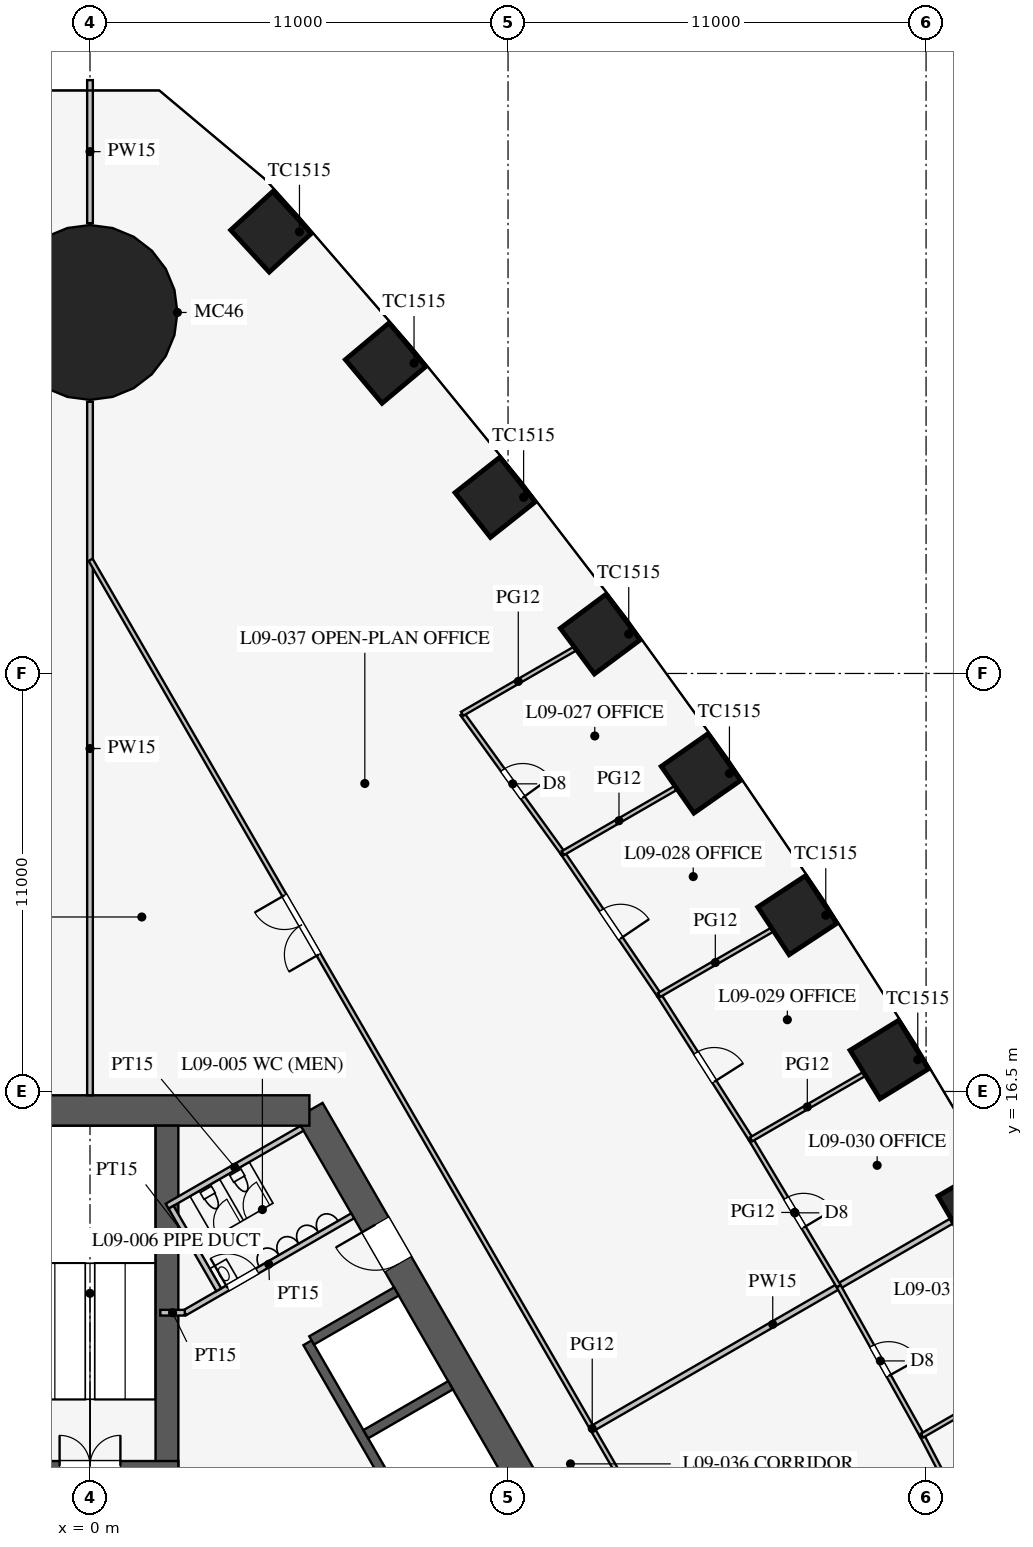
"""IFC4 building model, lengths in metres.
Left out: names, types, materials, properties, quantities, classifications, styles, units other than length and angle.
Written with IfcOpenShell. Run it as: python <this file> out.ifc"""

import sys

from ifc_helpers import new_model, si_unit, direction, frame, frame_2d, origin, origin_2d, place, context, subcontext, project, spatial, rectangle, circle, extrude, element, fill, save


model = new_model("IFC4")
c1 = context("Model", 3, precision=1e-05, world=origin(), true_north=direction((0.0, 1.0)))
c2 = subcontext(c1, "Body", "Model", "MODEL_VIEW")
j1 = project(units=[si_unit("LENGTHUNIT", "METRE"), si_unit("PLANEANGLEUNIT", "RADIAN")], contexts=[c1])
p1 = place(None, origin())
s1 = spatial("IfcSite", under=j1, at=p1, CompositionType="ELEMENT")
p2 = place(p1, origin())
s2 = spatial("IfcBuilding", under=s1, at=p2, CompositionType="ELEMENT")
p3 = place(p2, frame((0.0, 0.0, 41.7)))
s3 = spatial("IfcBuildingStorey", under=s2, at=p3, CompositionType="ELEMENT", Elevation=41.7)
for number, where, z_axis, x_axis in (
    (1, (23.338, 13.474, 0.0), (0.0, 0.0, 1.0), (-0.5, 0.866, 0.0)),
    (2, (21.031, 17.339, 0.0), (0.0, 0.0, 1.0), (-0.525, 0.851, 0.0)),
    (3, (18.611, 21.137, 0.0), (0.0, 0.0, 1.0), (-0.549, 0.836, 0.0)),
    (4, (16.076, 24.87, 0.0), (0.0, 0.0, 1.0), (-0.574, 0.819, 0.0)),
    (5, (13.426, 28.536, 0.0), (0.0, 0.0, 1.0), (-0.597, 0.802, 0.0)),
    (6, (10.66, 32.135, 0.0), (0.0, 0.0, 1.0), (-0.62, 0.784, 0.0)),
    (7, (7.776, 35.667, 0.0), (0.0, 0.0, 1.0), (-0.643, 0.766, 0.0)),
    (8, (4.762, 39.122, 0.0), (0.0, 0.0, 1.0), (-0.676, 0.737, 0.0)),
):
    element("IfcColumn", number, at=place(p3, frame(where, z_axis=z_axis, x_axis=x_axis)), inside=s3, PredefinedType="COLUMN", context=c2, shape_type="SweptSolid", body=[
        extrude(rectangle(XDim=1.5, YDim=1.5, at=origin_2d()), origin(), (0.0, 0.0, 1.0), 4.2),
    ])
p4 = place(p3, frame((0.0, 37.0, 0.0), z_axis=(0.0, 0.0, 1.0), x_axis=(1.0, 0.0, 0.0)))
e9 = element("IfcColumn", 9, at=p4, inside=s3, PredefinedType="COLUMN", context=c2, shape_type="SweptSolid", body=[
    extrude(circle(Radius=2.3, at=origin_2d()), origin(), (0.0, 0.0, 1.0), 4.2),
])
p5 = place(p3, frame((16.743, -3.0, 0.0), z_axis=(0.0, 0.0, 1.0), x_axis=(-0.500002442456, 0.866023993627, 0.0)))
e10 = element("IfcWall", 10, at=p5, inside=s3, PredefinedType="SHEAR", context=c2, shape_type="SweptSolid", body=[
    extrude(rectangle(XDim=21.939, YDim=0.8, at=frame_2d((10.97, 0.0))), origin(), (0.0, 0.0, 1.0), 4.2),
])
p6 = place(p5, frame((17.27, 0.0, 0.0)))
e11 = element("IfcOpeningElement", 11, at=p6, cuts=e10, PredefinedType="OPENING", context=c2, shape_type="SweptSolid", body=[
    extrude(rectangle(XDim=1.2, YDim=2.1, at=frame_2d((0.6, 1.05))), frame((0.0, 0.41, 0.0), z_axis=(0.0, -1.0, 0.0), x_axis=(1.0, 0.0, 0.0)), (0.0, 0.0, 1.0), 0.82),
])
p7 = place(p5, frame((3.47, 0.0, 0.0)))
e12 = element("IfcOpeningElement", 12, at=p7, cuts=e10, PredefinedType="OPENING", context=c2, shape_type="SweptSolid", body=[
    extrude(rectangle(XDim=1.2, YDim=2.1, at=frame_2d((0.6, 1.05))), frame((0.0, 0.41, 0.0), z_axis=(0.0, -1.0, 0.0), x_axis=(1.0, 0.0, 0.0)), (0.0, 0.0, 1.0), 0.82),
])
p8 = place(p3, frame((5.773, 16.0, 0.0), z_axis=(0.0, 0.0, 1.0), x_axis=(-1.0, 0.0, 0.0)))
e13 = element("IfcWall", 13, at=p8, inside=s3, PredefinedType="SHEAR", context=c2, shape_type="SweptSolid", body=[
    extrude(rectangle(XDim=11.547, YDim=0.8, at=frame_2d((5.773, 0.0))), origin(), (0.0, 0.0, 1.0), 4.2),
])
p9 = place(p3, frame((11.424, 0.014, 0.0), z_axis=(0.0, 0.0, 1.0), x_axis=(-0.500001763848, 0.866024385424, 0.0)))
e14 = element("IfcWall", 14, at=p9, inside=s3, PredefinedType="SHEAR", context=c2, shape_type="SweptSolid", body=[
    extrude(rectangle(XDim=11.4, YDim=0.25, at=frame_2d((5.7, 0.0))), origin(), (0.0, 0.0, 1.0), 4.2),
])
p10 = place(p3, frame((7.257, 7.481, 0.0), z_axis=(0.0, 0.0, 1.0), x_axis=(0.866046643894, 0.499963209246, 0.0)))
e15 = element("IfcWall", 15, at=p10, inside=s3, PredefinedType="SHEAR", context=c2, shape_type="SweptSolid", body=[
    extrude(rectangle(XDim=2.575, YDim=0.25, at=frame_2d((1.288, 0.0))), origin(), (0.0, 0.0, 1.0), 4.2),
])
p11 = place(p3, frame((5.832, 9.949, 0.0), z_axis=(0.0, 0.0, 1.0), x_axis=(0.866029291668, 0.499993265928, 0.0)))
e16 = element("IfcWall", 16, at=p11, inside=s3, PredefinedType="SHEAR", context=c2, shape_type="SweptSolid", body=[
    extrude(rectangle(XDim=2.575, YDim=0.25, at=frame_2d((1.288, 0.0))), origin(), (0.0, 0.0, 1.0), 4.2),
])
p12 = place(p3, frame((2.025, 6.525, 0.0), z_axis=(0.0, 0.0, 1.0), x_axis=(0.0, 1.0, 0.0)))
e17 = element("IfcWall", 17, at=p12, inside=s3, PredefinedType="SHEAR", context=c2, shape_type="SweptSolid", body=[
    extrude(rectangle(XDim=9.075, YDim=0.6, at=frame_2d((4.538, 0.0))), origin(), (0.0, 0.0, 1.0), 4.2),
])
p13 = place(p3, frame((2.325, 6.65, 0.0), z_axis=(0.0, 0.0, 1.0), x_axis=(-1.0, 0.0, 0.0)))
e18 = element("IfcWall", 18, at=p13, inside=s3, PredefinedType="SHEAR", context=c2, shape_type="SweptSolid", body=[
    extrude(rectangle(XDim=4.65, YDim=0.25, at=frame_2d((2.325, 0.0))), origin(), (0.0, 0.0, 1.0), 4.2),
])
p14 = place(p13, frame((1.525, 0.0, 0.0)))
e19 = element("IfcOpeningElement", 19, at=p14, cuts=e18, PredefinedType="OPENING", context=c2, shape_type="SweptSolid", body=[
    extrude(rectangle(XDim=1.6, YDim=2.1, at=frame_2d((0.8, 1.05))), frame((0.0, 0.135, 0.0), z_axis=(0.0, -1.0, 0.0), x_axis=(1.0, 0.0, 0.0)), (0.0, 0.0, 1.0), 0.27),
])
p15 = place(p3, frame((2.495, 10.678, 0.0), z_axis=(0.0, 0.0, 1.0), x_axis=(0.86602216432, 0.500005610874, 0.0)))
e20 = element("IfcWall", 20, at=p15, inside=s3, PredefinedType="PARTITIONING", context=c2, shape_type="SweptSolid", body=[
    extrude(rectangle(XDim=5.1, YDim=0.15, at=frame_2d((2.55, 0.0))), origin(), (0.0, 0.0, 1.0), 4.0),
])
p16 = place(p15, frame((1.3, 0.0, 0.0)))
e21 = element("IfcOpeningElement", 21, at=p16, cuts=e20, PredefinedType="OPENING", context=c2, shape_type="SweptSolid", body=[
    extrude(rectangle(XDim=0.9, YDim=2.1, at=frame_2d((0.45, 1.05))), frame((0.0, 0.085, 0.0), z_axis=(0.0, -1.0, 0.0), x_axis=(1.0, 0.0, 0.0)), (0.0, 0.0, 1.0), 0.17),
])
p17 = place(p3, frame((2.495, 10.678, 0.0), z_axis=(0.0, 0.0, 1.0), x_axis=(-1.0, 0.0, 0.0)))
e22 = element("IfcWall", 22, at=p17, inside=s3, PredefinedType="PARTITIONING", context=c2, shape_type="SweptSolid", body=[
    extrude(rectangle(XDim=0.645, YDim=0.15, at=frame_2d((0.323, 0.0))), origin(), (0.0, 0.0, 1.0), 4.0),
])
p18 = place(p3, frame((2.031, 13.482, 0.0), z_axis=(0.0, 0.0, 1.0), x_axis=(0.866050731258, 0.499956128963, 0.0)))
e23 = element("IfcWall", 23, at=p18, inside=s3, PredefinedType="PARTITIONING", context=c2, shape_type="SweptSolid", body=[
    extrude(rectangle(XDim=4.1, YDim=0.15, at=frame_2d((2.05, 0.0))), origin(), (0.0, 0.0, 1.0), 4.0),
])
p19 = place(p3, frame((3.389, 11.281, 0.0), z_axis=(0.0, 0.0, 1.0), x_axis=(-0.499989096993, 0.866031698547, 0.0)))
e24 = element("IfcWall", 24, at=p19, inside=s3, PredefinedType="PARTITIONING", context=c2, shape_type="SweptSolid", body=[
    extrude(rectangle(XDim=2.51, YDim=0.15, at=frame_2d((1.255, 0.0))), origin(), (0.0, 0.0, 1.0), 4.0),
])
p20 = place(p3, frame((0.0, 16.4, 0.0), z_axis=(0.0, 0.0, 1.0), x_axis=(0.0, 1.0, 0.0)))
e25 = element("IfcWall", 25, at=p20, inside=s3, PredefinedType="PARTITIONING", context=c2, shape_type="SweptSolid", body=[
    extrude(rectangle(XDim=18.25, YDim=0.15, at=frame_2d((9.125, 0.0))), origin(), (0.0, 0.0, 1.0), 2.3),
])
p21 = place(p3, frame((0.0, 39.35, 0.0), z_axis=(0.0, 0.0, 1.0), x_axis=(0.0, 1.0, 0.0)))
e26 = element("IfcWall", 26, at=p21, inside=s3, PredefinedType="PARTITIONING", context=c2, shape_type="SweptSolid", body=[
    extrude(rectangle(XDim=3.764, YDim=0.15, at=frame_2d((1.882, 0.0))), origin(), (0.0, 0.0, 1.0), 2.3),
])
p22 = place(p3, frame((13.268, 7.66, 0.0), z_axis=(0.0, 0.0, 1.0), x_axis=(0.866017319748, 0.500014001701, 0.0)))
e27 = element("IfcWall", 27, at=p22, inside=s3, PredefinedType="PARTITIONING", context=c2, shape_type="SweptSolid", body=[
    extrude(rectangle(XDim=10.849, YDim=0.15, at=frame_2d((5.424, 0.0))), origin(), (0.0, 0.0, 1.0), 3.2),
])
p23 = place(p3, frame((26.415, -15.231, 0.0), z_axis=(0.0, 0.0, 1.0), x_axis=(-0.50000091641, 0.866024874695, 0.0)))
e28 = element("IfcWall", 28, at=p23, inside=s3, PredefinedType="PARTITIONING", context=c2, shape_type="SweptSolid", body=[
    extrude(rectangle(XDim=52.796, YDim=0.12, at=frame_2d((26.398, 0.0))), origin(), (0.0, 0.0, 1.0), 2.9),
])
p24 = place(p23, frame((10.2, 0.0, 0.15)))
e29 = element("IfcOpeningElement", 29, at=p24, cuts=e28, PredefinedType="OPENING", context=c2, shape_type="SweptSolid", body=[
    extrude(rectangle(XDim=1.8, YDim=2.1, at=frame_2d((0.9, 1.05))), frame((0.0, 0.07, 0.0), z_axis=(0.0, -1.0, 0.0), x_axis=(1.0, 0.0, 0.0)), (0.0, 0.0, 1.0), 0.14),
])
p25 = place(p23, frame((40.8, 0.0, 0.15)))
e30 = element("IfcOpeningElement", 30, at=p25, cuts=e28, PredefinedType="OPENING", context=c2, shape_type="SweptSolid", body=[
    extrude(rectangle(XDim=1.8, YDim=2.1, at=frame_2d((0.9, 1.05))), frame((0.0, 0.07, 0.0), z_axis=(0.0, -1.0, 0.0), x_axis=(1.0, 0.0, 0.0)), (0.0, 0.0, 1.0), 0.14),
])
p26 = place(p3, frame((19.701, 11.374, 0.0), z_axis=(0.0, 0.0, 1.0), x_axis=(-0.512483962191, 0.858696796604, 0.0)))
e31 = element("IfcWall", 31, at=p26, inside=s3, PredefinedType="PARTITIONING", context=c2, shape_type="SweptSolid", body=[
    extrude(rectangle(XDim=4.5, YDim=0.12, at=frame_2d((2.25, 0.0))), origin(), (0.0, 0.0, 1.0), 2.9),
])
p27 = place(p26, frame((1.8, 0.0, 0.15)))
e32 = element("IfcOpeningElement", 32, at=p27, cuts=e31, PredefinedType="OPENING", context=c2, shape_type="SweptSolid", body=[
    extrude(rectangle(XDim=0.9, YDim=2.1, at=frame_2d((0.45, 1.05))), frame((0.0, 0.07, 0.0), z_axis=(0.0, -1.0, 0.0), x_axis=(1.0, 0.0, 0.0)), (0.0, 0.0, 1.0), 0.14),
])
p28 = place(p3, frame((12.441, 22.771, 0.0), z_axis=(0.0, 0.0, 1.0), x_axis=(-0.585376255171, 0.810761765183, 0.0)))
e33 = element("IfcWall", 33, at=p28, inside=s3, PredefinedType="PARTITIONING", context=c2, shape_type="SweptSolid", body=[
    extrude(rectangle(XDim=4.523, YDim=0.12, at=frame_2d((2.262, 0.0))), origin(), (0.0, 0.0, 1.0), 2.9),
])
p29 = place(p28, frame((1.8, 0.0, 0.15)))
e34 = element("IfcOpeningElement", 34, at=p29, cuts=e33, PredefinedType="OPENING", context=c2, shape_type="SweptSolid", body=[
    extrude(rectangle(XDim=0.9, YDim=2.1, at=frame_2d((0.45, 1.05))), frame((0.0, 0.07, 0.0), z_axis=(0.0, -1.0, 0.0), x_axis=(1.0, 0.0, 0.0)), (0.0, 0.0, 1.0), 0.14),
])
p30 = place(p3, frame((17.395, 15.239, 0.0), z_axis=(0.0, 0.0, 1.0), x_axis=(-0.537243691336, 0.843427066272, 0.0)))
e35 = element("IfcWall", 35, at=p30, inside=s3, PredefinedType="PARTITIONING", context=c2, shape_type="SweptSolid", body=[
    extrude(rectangle(XDim=4.504, YDim=0.12, at=frame_2d((2.252, 0.0))), origin(), (0.0, 0.0, 1.0), 2.9),
])
p31 = place(p30, frame((1.8, 0.0, 0.15)))
e36 = element("IfcOpeningElement", 36, at=p31, cuts=e35, PredefinedType="OPENING", context=c2, shape_type="SweptSolid", body=[
    extrude(rectangle(XDim=0.9, YDim=2.1, at=frame_2d((0.45, 1.05))), frame((0.0, 0.07, 0.0), z_axis=(0.0, -1.0, 0.0), x_axis=(1.0, 0.0, 0.0)), (0.0, 0.0, 1.0), 0.14),
])
p32 = place(p3, frame((14.975, 19.038, 0.0), z_axis=(0.0, 0.0, 1.0), x_axis=(-0.561512004239, 0.827468591002, 0.0)))
e37 = element("IfcWall", 37, at=p32, inside=s3, PredefinedType="PARTITIONING", context=c2, shape_type="SweptSolid", body=[
    extrude(rectangle(XDim=4.512, YDim=0.12, at=frame_2d((2.256, 0.0))), origin(), (0.0, 0.0, 1.0), 2.9),
])
p33 = place(p32, frame((1.8, 0.0, 0.15)))
e38 = element("IfcOpeningElement", 38, at=p33, cuts=e37, PredefinedType="OPENING", context=c2, shape_type="SweptSolid", body=[
    extrude(rectangle(XDim=0.9, YDim=2.1, at=frame_2d((0.45, 1.05))), frame((0.0, 0.07, 0.0), z_axis=(0.0, -1.0, 0.0), x_axis=(1.0, 0.0, 0.0)), (0.0, 0.0, 1.0), 0.14),
])
p34 = place(p3, frame((21.895, 7.445, 0.0), z_axis=(0.0, 0.0, 1.0), x_axis=(-0.487415216275, 0.87317031955, 0.0)))
e39 = element("IfcWall", 39, at=p34, inside=s3, PredefinedType="PARTITIONING", context=c2, shape_type="SweptSolid", body=[
    extrude(rectangle(XDim=4.5, YDim=0.12, at=frame_2d((2.25, 0.0))), origin(), (0.0, 0.0, 1.0), 2.9),
])
p35 = place(p34, frame((1.8, 0.0, 0.15)))
e40 = element("IfcOpeningElement", 40, at=p35, cuts=e39, PredefinedType="OPENING", context=c2, shape_type="SweptSolid", body=[
    extrude(rectangle(XDim=0.9, YDim=2.1, at=frame_2d((0.45, 1.05))), frame((0.0, 0.07, 0.0), z_axis=(0.0, -1.0, 0.0), x_axis=(1.0, 0.0, 0.0)), (0.0, 0.0, 1.0), 0.14),
])
p36 = place(p3, frame((23.975, 3.449, 0.0), z_axis=(0.0, 0.0, 1.0), x_axis=(-0.461810056307, 0.886978845235, 0.0)))
e41 = element("IfcWall", 41, at=p36, inside=s3, PredefinedType="PARTITIONING", context=c2, shape_type="SweptSolid", body=[
    extrude(rectangle(XDim=4.504, YDim=0.12, at=frame_2d((2.252, 0.0))), origin(), (0.0, 0.0, 1.0), 2.9),
])
p37 = place(p36, frame((1.75, 0.0, 0.15)))
e42 = element("IfcOpeningElement", 42, at=p37, cuts=e41, PredefinedType="OPENING", context=c2, shape_type="SweptSolid", body=[
    extrude(rectangle(XDim=1.0, YDim=2.1, at=frame_2d((0.5, 1.05))), frame((0.0, 0.07, 0.0), z_axis=(0.0, -1.0, 0.0), x_axis=(1.0, 0.0, 0.0)), (0.0, 0.0, 1.0), 0.14),
])
p38 = place(p3, frame((12.441, 22.771, 0.0), z_axis=(0.0, 0.0, 1.0), x_axis=(0.866016478054, 0.500015459501, 0.0)))
e43 = element("IfcWall", 43, at=p38, inside=s3, PredefinedType="PARTITIONING", context=c2, shape_type="SweptSolid", body=[
    extrude(rectangle(XDim=3.414, YDim=0.12, at=frame_2d((1.707, 0.0))), origin(), (0.0, 0.0, 1.0), 2.9),
])
p39 = place(p3, frame((9.793, 26.439, 0.0), z_axis=(0.0, 0.0, 1.0), x_axis=(0.866040105854, 0.499974534403, 0.0)))
e44 = element("IfcWall", 44, at=p39, inside=s3, PredefinedType="PARTITIONING", context=c2, shape_type="SweptSolid", body=[
    extrude(rectangle(XDim=3.409, YDim=0.12, at=frame_2d((1.705, 0.0))), origin(), (0.0, 0.0, 1.0), 2.9),
])
p40 = place(p3, frame((17.395, 15.239, 0.0), z_axis=(0.0, 0.0, 1.0), x_axis=(0.866015553834, 0.500017060227, 0.0)))
e45 = element("IfcWall", 45, at=p40, inside=s3, PredefinedType="PARTITIONING", context=c2, shape_type="SweptSolid", body=[
    extrude(rectangle(XDim=3.419, YDim=0.12, at=frame_2d((1.71, 0.0))), origin(), (0.0, 0.0, 1.0), 2.9),
])
p41 = place(p3, frame((14.975, 19.038, 0.0), z_axis=(0.0, 0.0, 1.0), x_axis=(0.866014265796, 0.500019291066, 0.0)))
e46 = element("IfcWall", 46, at=p41, inside=s3, PredefinedType="PARTITIONING", context=c2, shape_type="SweptSolid", body=[
    extrude(rectangle(XDim=3.417, YDim=0.12, at=frame_2d((1.708, 0.0))), origin(), (0.0, 0.0, 1.0), 2.9),
])
p42 = place(p3, frame((21.895, 7.445, 0.0), z_axis=(0.0, 0.0, 1.0), x_axis=(0.866015553834, 0.500017060227, 0.0)))
e47 = element("IfcWall", 47, at=p42, inside=s3, PredefinedType="PARTITIONING", context=c2, shape_type="SweptSolid", body=[
    extrude(rectangle(XDim=3.419, YDim=0.12, at=frame_2d((1.71, 0.0))), origin(), (0.0, 0.0, 1.0), 2.9),
])
p43 = place(p16, origin())
e48 = element("IfcDoor", 48, at=p43, inside=s3, OperationType="SINGLE_SWING_LEFT", PredefinedType="DOOR", context=c2, shape_type="SweptSolid", body=[
    extrude(rectangle(XDim=0.9, YDim=2.1, at=frame_2d((0.45, 1.05))), frame((0.0, 0.025, 0.0), z_axis=(0.0, -1.0, 0.0), x_axis=(1.0, 0.0, 0.0)), (0.0, 0.0, 1.0), 0.05),
])
fill(e21, e48)
p44 = place(p14, frame((1.6, 0.0, 0.0), z_axis=(0.0, 0.0, 1.0), x_axis=(-1.0, 0.0, 0.0)))
e49 = element("IfcDoor", 49, at=p44, inside=s3, OperationType="DOUBLE_DOOR_SINGLE_SWING", PredefinedType="DOOR", context=c2, shape_type="SweptSolid", body=[
    extrude(rectangle(XDim=1.6, YDim=2.1, at=frame_2d((0.8, 1.05))), frame((0.0, 0.025, 0.0), z_axis=(0.0, -1.0, 0.0), x_axis=(1.0, 0.0, 0.0)), (0.0, 0.0, 1.0), 0.05),
])
fill(e19, e49)
p45 = place(p6, origin())
e50 = element("IfcDoor", 50, at=p45, inside=s3, OperationType="SINGLE_SWING_RIGHT", PredefinedType="DOOR", context=c2, shape_type="SweptSolid", body=[
    extrude(rectangle(XDim=1.2, YDim=2.1, at=frame_2d((0.6, 1.05))), frame((0.0, 0.025, 0.0), z_axis=(0.0, -1.0, 0.0), x_axis=(1.0, 0.0, 0.0)), (0.0, 0.0, 1.0), 0.05),
])
fill(e11, e50)
p46 = place(p29, frame((0.9, 0.0, 0.0), z_axis=(0.0, 0.0, 1.0), x_axis=(-1.0, 0.0, 0.0)))
e51 = element("IfcDoor", 51, at=p46, inside=s3, OperationType="SINGLE_SWING_RIGHT", PredefinedType="DOOR", context=c2, shape_type="SweptSolid", body=[
    extrude(rectangle(XDim=0.9, YDim=2.1, at=frame_2d((0.45, 1.05))), frame((0.0, 0.025, 0.0), z_axis=(0.0, -1.0, 0.0), x_axis=(1.0, 0.0, 0.0)), (0.0, 0.0, 1.0), 0.05),
])
fill(e34, e51)
p47 = place(p33, frame((0.9, 0.0, 0.0), z_axis=(0.0, 0.0, 1.0), x_axis=(-1.0, 0.0, 0.0)))
e52 = element("IfcDoor", 52, at=p47, inside=s3, OperationType="SINGLE_SWING_RIGHT", PredefinedType="DOOR", context=c2, shape_type="SweptSolid", body=[
    extrude(rectangle(XDim=0.9, YDim=2.1, at=frame_2d((0.45, 1.05))), frame((0.0, 0.025, 0.0), z_axis=(0.0, -1.0, 0.0), x_axis=(1.0, 0.0, 0.0)), (0.0, 0.0, 1.0), 0.05),
])
fill(e38, e52)
p48 = place(p31, frame((0.9, 0.0, 0.0), z_axis=(0.0, 0.0, 1.0), x_axis=(-1.0, 0.0, 0.0)))
e53 = element("IfcDoor", 53, at=p48, inside=s3, OperationType="SINGLE_SWING_RIGHT", PredefinedType="DOOR", context=c2, shape_type="SweptSolid", body=[
    extrude(rectangle(XDim=0.9, YDim=2.1, at=frame_2d((0.45, 1.05))), frame((0.0, 0.025, 0.0), z_axis=(0.0, -1.0, 0.0), x_axis=(1.0, 0.0, 0.0)), (0.0, 0.0, 1.0), 0.05),
])
fill(e36, e53)
p49 = place(p27, frame((0.9, 0.0, 0.0), z_axis=(0.0, 0.0, 1.0), x_axis=(-1.0, 0.0, 0.0)))
e54 = element("IfcDoor", 54, at=p49, inside=s3, OperationType="SINGLE_SWING_RIGHT", PredefinedType="DOOR", context=c2, shape_type="SweptSolid", body=[
    extrude(rectangle(XDim=0.9, YDim=2.1, at=frame_2d((0.45, 1.05))), frame((0.0, 0.025, 0.0), z_axis=(0.0, -1.0, 0.0), x_axis=(1.0, 0.0, 0.0)), (0.0, 0.0, 1.0), 0.05),
])
fill(e32, e54)
p50 = place(p35, frame((0.9, 0.0, 0.0), z_axis=(0.0, 0.0, 1.0), x_axis=(-1.0, 0.0, 0.0)))
e55 = element("IfcDoor", 55, at=p50, inside=s3, OperationType="SINGLE_SWING_RIGHT", PredefinedType="DOOR", context=c2, shape_type="SweptSolid", body=[
    extrude(rectangle(XDim=0.9, YDim=2.1, at=frame_2d((0.45, 1.05))), frame((0.0, 0.025, 0.0), z_axis=(0.0, -1.0, 0.0), x_axis=(1.0, 0.0, 0.0)), (0.0, 0.0, 1.0), 0.05),
])
fill(e40, e55)
p51 = place(p25, origin())
e56 = element("IfcDoor", 56, at=p51, inside=s3, OperationType="DOUBLE_DOOR_SINGLE_SWING", PredefinedType="DOOR", context=c2, shape_type="SweptSolid", body=[
    extrude(rectangle(XDim=1.8, YDim=2.1, at=frame_2d((0.9, 1.05))), frame((0.0, 0.025, 0.0), z_axis=(0.0, -1.0, 0.0), x_axis=(1.0, 0.0, 0.0)), (0.0, 0.0, 1.0), 0.05),
])
fill(e30, e56)
save(model, sys.argv[1])
